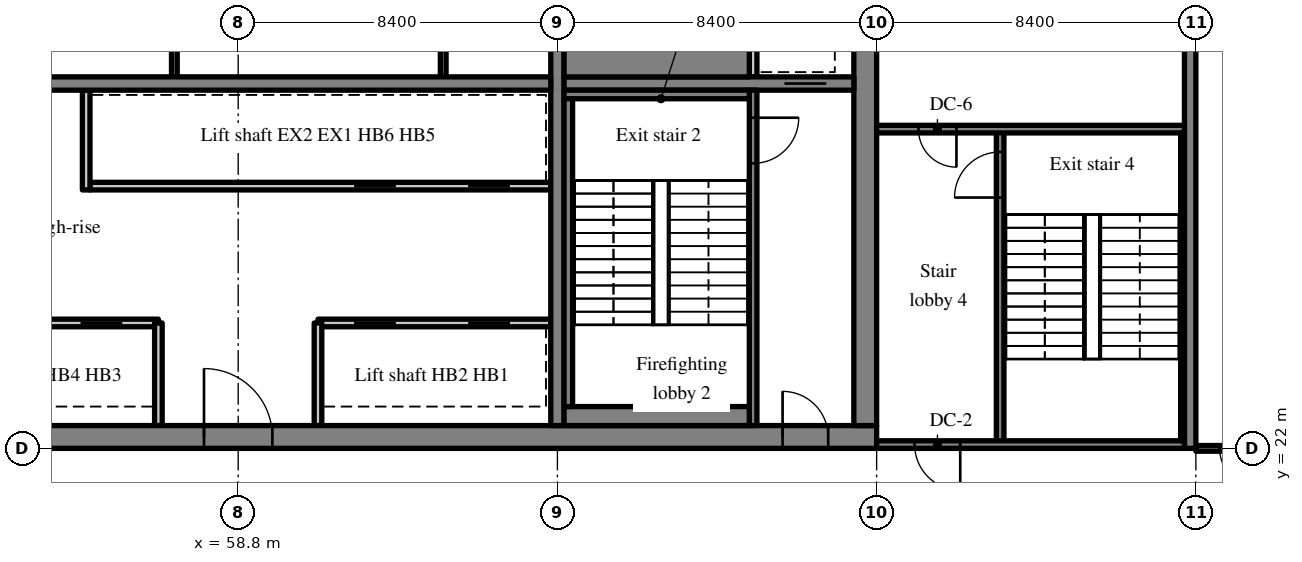
"""IFC4 building model, lengths in metres.
Left out: names, types, materials, properties, quantities, classifications, styles, units other than length and angle.
Written with IfcOpenShell. Run it as: python <this file> out.ifc"""

import sys

from ifc_helpers import new_model, si_unit, direction, frame, frame_2d, origin, place, context, subcontext, project, spatial, rectangle, extrude, source, transform, mapped, element, fill, save


model = new_model("IFC4")
c1 = context("Model", 3, precision=1e-05, world=origin(), true_north=direction((0.0, 1.0)))
c2 = subcontext(c1, "Body", "Model", "MODEL_VIEW")
j1 = project(units=[si_unit("LENGTHUNIT", "METRE"), si_unit("PLANEANGLEUNIT", "RADIAN")], contexts=[c1])
p1 = place(None, origin())
s1 = spatial("IfcSite", under=j1, at=p1, CompositionType="ELEMENT")
p2 = place(p1, origin())
s2 = spatial("IfcBuilding", under=s1, at=p2, CompositionType="ELEMENT")
p3 = place(p2, frame((0.0, 0.0, 217.9)))
s3 = spatial("IfcBuildingStorey", under=s2, at=p3, CompositionType="ELEMENT", Elevation=217.9)
m1 = source(origin(), c2, "Body", "SweptSolid", [
    extrude(rectangle(XDim=50.4, YDim=0.6, at=frame_2d((25.2, 0.0))), origin(), (0.0, 0.0, 1.0), 3.62),
])
p4 = place(p3, frame((25.2, 22.3, 0.0), z_axis=(0.0, 0.0, 1.0), x_axis=(1.0, 0.0, 0.0)))
e1 = element("IfcWall", 1, at=p4, inside=s3, PredefinedType="SHEAR", context=c2, shape_type="MappedRepresentation", body=[
    mapped(m1, transform((0.0, 0.0, 0.0), scale=1.0)),
])
m2 = source(origin(), c2, "Body", "SweptSolid", [
    extrude(rectangle(XDim=1.8, YDim=2.1, at=frame_2d((0.9, 1.05))), frame((0.0, 0.31, 0.0), z_axis=(0.0, -1.0, 0.0), x_axis=(1.0, 0.0, 0.0)), (0.0, 0.0, 1.0), 0.62),
])
p5 = place(p4, frame((15.9, 0.0, 0.0)))
e2 = element("IfcOpeningElement", 2, at=p5, cuts=e1, PredefinedType="OPENING", context=c2, shape_type="MappedRepresentation", body=[
    mapped(m2, transform((0.0, 0.0, 0.0), scale=1.0)),
])
m3 = source(origin(), c2, "Body", "SweptSolid", [
    extrude(rectangle(XDim=0.9, YDim=2.1, at=frame_2d((0.45, 1.05))), frame((0.0, 0.31, 0.0), z_axis=(0.0, -1.0, 0.0), x_axis=(1.0, 0.0, 0.0)), (0.0, 0.0, 1.0), 0.62),
])
p6 = place(p4, frame((9.687, 0.0, 0.0)))
e3 = element("IfcOpeningElement", 3, at=p6, cuts=e1, PredefinedType="OPENING", context=c2, shape_type="MappedRepresentation", body=[
    mapped(m3, transform((0.0, 0.0, 0.0), scale=1.0)),
])
p7 = place(p4, frame((21.513, 0.0, 0.0)))
e4 = element("IfcOpeningElement", 4, at=p7, cuts=e1, PredefinedType="OPENING", context=c2, shape_type="MappedRepresentation", body=[
    mapped(m3, transform((0.0, 0.0, 0.0), scale=1.0)),
])
p8 = place(p4, frame((32.7, 0.0, 0.0)))
e5 = element("IfcOpeningElement", 5, at=p8, cuts=e1, PredefinedType="OPENING", context=c2, shape_type="MappedRepresentation", body=[
    mapped(m2, transform((0.0, 0.0, 0.0), scale=1.0)),
])
m4 = source(origin(), c2, "Body", "SweptSolid", [
    extrude(rectangle(XDim=1.2, YDim=2.1, at=frame_2d((0.6, 1.05))), frame((0.0, 0.31, 0.0), z_axis=(0.0, -1.0, 0.0), x_axis=(1.0, 0.0, 0.0)), (0.0, 0.0, 1.0), 0.62),
])
p9 = place(p4, frame((6.488, 0.0, 0.0)))
e6 = element("IfcOpeningElement", 6, at=p9, cuts=e1, PredefinedType="OPENING", context=c2, shape_type="MappedRepresentation", body=[
    mapped(m4, transform((0.0, 0.0, 0.0), scale=1.0)),
])
p10 = place(p4, frame((47.925, 0.0, 0.0)))
e7 = element("IfcOpeningElement", 7, at=p10, cuts=e1, PredefinedType="OPENING", context=c2, shape_type="MappedRepresentation", body=[
    mapped(m4, transform((0.0, 0.0, 0.0), scale=1.0)),
])
m5 = source(origin(), c2, "Body", "SweptSolid", [
    extrude(rectangle(XDim=18.8, YDim=0.6, at=frame_2d((9.4, 0.0))), origin(), (0.0, 0.0, 1.0), 3.62),
])
p11 = place(p3, frame((75.3, 22.6, 0.0), z_axis=(0.0, 0.0, 1.0), x_axis=(0.0, 1.0, 0.0)))
e8 = element("IfcWall", 8, at=p11, inside=s3, PredefinedType="SHEAR", context=c2, shape_type="MappedRepresentation", body=[
    mapped(m5, transform((0.0, 0.0, 0.0), scale=1.0)),
])
p12 = place(p11, frame((12.8, 0.0, 0.0)))
e9 = element("IfcOpeningElement", 9, at=p12, cuts=e8, PredefinedType="OPENING", context=c2, shape_type="MappedRepresentation", body=[
    mapped(m4, transform((0.0, 0.0, 0.0), scale=1.0)),
])
m6 = source(origin(), c2, "Body", "SweptSolid", [
    extrude(rectangle(XDim=18.8, YDim=0.35, at=frame_2d((9.4, 0.0))), origin(), (0.0, 0.0, 1.0), 3.62),
])
p13 = place(p3, frame((67.2, 22.6, 0.0), z_axis=(0.0, 0.0, 1.0), x_axis=(0.0, 1.0, 0.0)))
e10 = element("IfcWall", 10, at=p13, inside=s3, PredefinedType="SHEAR", context=c2, shape_type="MappedRepresentation", body=[
    mapped(m6, transform((0.0, 0.0, 0.0), scale=1.0)),
])
m7 = source(origin(), c2, "Body", "SweptSolid", [
    extrude(rectangle(XDim=16.45, YDim=0.35, at=frame_2d((8.225, 0.0))), origin(), (0.0, 0.0, 1.0), 3.62),
])
p14 = place(p3, frame((50.575, 31.6, 0.0), z_axis=(0.0, 0.0, 1.0), x_axis=(1.0, 0.0, 0.0)))
e11 = element("IfcWall", 11, at=p14, inside=s3, PredefinedType="SHEAR", context=c2, shape_type="MappedRepresentation", body=[
    mapped(m7, transform((0.0, 0.0, 0.0), scale=1.0)),
])
m8 = source(origin(), c2, "Body", "SweptSolid", [
    extrude(rectangle(XDim=1.0, YDim=2.1, at=frame_2d((0.5, 1.05))), frame((0.0, 0.185, 0.0), z_axis=(0.0, -1.0, 0.0), x_axis=(1.0, 0.0, 0.0)), (0.0, 0.0, 1.0), 0.37),
])
p15 = place(p14, frame((0.613, 0.0, 0.0)))
e12 = element("IfcOpeningElement", 12, at=p15, cuts=e11, PredefinedType="OPENING", context=c2, shape_type="MappedRepresentation", body=[
    mapped(m8, transform((0.0, 0.0, 0.0), scale=1.0)),
])
m9 = source(origin(), c2, "Body", "SweptSolid", [
    extrude(rectangle(XDim=7.625, YDim=0.35, at=frame_2d((3.812, 0.0))), origin(), (0.0, 0.0, 1.0), 3.62),
])
p16 = place(p3, frame((67.375, 31.6, 0.0), z_axis=(0.0, 0.0, 1.0), x_axis=(1.0, 0.0, 0.0)))
e13 = element("IfcWall", 13, at=p16, inside=s3, PredefinedType="SHEAR", context=c2, shape_type="MappedRepresentation", body=[
    mapped(m9, transform((0.0, 0.0, 0.0), scale=1.0)),
])
m10 = source(origin(), c2, "Body", "SweptSolid", [
    extrude(rectangle(XDim=1.1, YDim=2.1, at=frame_2d((0.55, 1.05))), frame((0.0, 0.185, 0.0), z_axis=(0.0, -1.0, 0.0), x_axis=(1.0, 0.0, 0.0)), (0.0, 0.0, 1.0), 0.37),
])
p17 = place(p16, frame((5.8, 0.0, 0.0)))
e14 = element("IfcOpeningElement", 14, at=p17, cuts=e13, PredefinedType="OPENING", context=c2, shape_type="MappedRepresentation", body=[
    mapped(m10, transform((0.0, 0.0, 0.0), scale=1.0)),
])
m11 = source(origin(), c2, "Body", "SweptSolid", [
    extrude(rectangle(XDim=18.4, YDim=0.3, at=frame_2d((9.2, 0.0))), origin(), (0.0, 0.0, 1.0), 3.62),
])
p18 = place(p3, frame((83.85, 22.0, 0.0), z_axis=(0.0, 0.0, 1.0), x_axis=(0.0, 1.0, 0.0)))
e15 = element("IfcWall", 15, at=p18, inside=s3, PredefinedType="SHEAR", context=c2, shape_type="MappedRepresentation", body=[
    mapped(m11, transform((0.0, 0.0, 0.0), scale=1.0)),
])
m12 = source(origin(), c2, "Body", "SweptSolid", [
    extrude(rectangle(XDim=6.125, YDim=0.2, at=frame_2d((3.062, 0.0))), origin(), (0.0, 0.0, 1.0), 3.62),
])
p19 = place(p3, frame((67.025, 25.3, 0.0), z_axis=(0.0, 0.0, 1.0), x_axis=(-1.0, 0.0, 0.0)))
e16 = element("IfcWall", 16, at=p19, inside=s3, PredefinedType="SOLIDWALL", context=c2, shape_type="MappedRepresentation", body=[
    mapped(m12, transform((0.0, 0.0, 0.0), scale=1.0)),
])
m13 = source(origin(), c2, "Body", "SweptSolid", [
    extrude(rectangle(XDim=1.1, YDim=2.1, at=frame_2d((0.55, 1.05))), frame((0.0, 0.11, 0.0), z_axis=(0.0, -1.0, 0.0), x_axis=(1.0, 0.0, 0.0)), (0.0, 0.0, 1.0), 0.22),
])
p20 = place(p19, frame((1.075, 0.0, 0.0)))
e17 = element("IfcOpeningElement", 17, at=p20, cuts=e16, PredefinedType="OPENING", context=c2, shape_type="MappedRepresentation", body=[
    mapped(m13, transform((0.0, 0.0, 0.0), scale=1.0)),
])
p21 = place(p19, frame((4.075, 0.0, 0.0)))
e18 = element("IfcOpeningElement", 18, at=p21, cuts=e16, PredefinedType="OPENING", context=c2, shape_type="MappedRepresentation", body=[
    mapped(m13, transform((0.0, 0.0, 0.0), scale=1.0)),
])
m14 = source(origin(), c2, "Body", "SweptSolid", [
    extrude(rectangle(XDim=6.0, YDim=0.2, at=frame_2d((3.0, 0.0))), origin(), (0.0, 0.0, 1.0), 3.62),
])
p22 = place(p3, frame((56.7, 25.3, 0.0), z_axis=(0.0, 0.0, 1.0), x_axis=(-1.0, 0.0, 0.0)))
e19 = element("IfcWall", 19, at=p22, inside=s3, PredefinedType="SOLIDWALL", context=c2, shape_type="MappedRepresentation", body=[
    mapped(m14, transform((0.0, 0.0, 0.0), scale=1.0)),
])
p23 = place(p22, frame((0.95, 0.0, 0.0)))
e20 = element("IfcOpeningElement", 20, at=p23, cuts=e19, PredefinedType="OPENING", context=c2, shape_type="MappedRepresentation", body=[
    mapped(m13, transform((0.0, 0.0, 0.0), scale=1.0)),
])
p24 = place(p22, frame((3.95, 0.0, 0.0)))
e21 = element("IfcOpeningElement", 21, at=p24, cuts=e19, PredefinedType="OPENING", context=c2, shape_type="MappedRepresentation", body=[
    mapped(m13, transform((0.0, 0.0, 0.0), scale=1.0)),
])
m15 = source(origin(), c2, "Body", "SweptSolid", [
    extrude(rectangle(XDim=12.125, YDim=0.2, at=frame_2d((6.062, 0.0))), origin(), (0.0, 0.0, 1.0), 3.62),
])
p25 = place(p3, frame((67.025, 28.9, 0.0), z_axis=(0.0, 0.0, 1.0), x_axis=(-1.0, 0.0, 0.0)))
e22 = element("IfcWall", 22, at=p25, inside=s3, PredefinedType="SOLIDWALL", context=c2, shape_type="MappedRepresentation", body=[
    mapped(m15, transform((0.0, 0.0, 0.0), scale=1.0)),
])
p26 = place(p25, frame((1.075, 0.0, 0.0)))
e23 = element("IfcOpeningElement", 23, at=p26, cuts=e22, PredefinedType="OPENING", context=c2, shape_type="MappedRepresentation", body=[
    mapped(m13, transform((0.0, 0.0, 0.0), scale=1.0)),
])
p27 = place(p25, frame((4.075, 0.0, 0.0)))
e24 = element("IfcOpeningElement", 24, at=p27, cuts=e22, PredefinedType="OPENING", context=c2, shape_type="MappedRepresentation", body=[
    mapped(m13, transform((0.0, 0.0, 0.0), scale=1.0)),
])
m16 = source(origin(), c2, "Body", "SweptSolid", [
    extrude(rectangle(XDim=2.7, YDim=0.2, at=frame_2d((1.35, 0.0))), origin(), (0.0, 0.0, 1.0), 3.62),
])
for number, where, z_axis, x_axis in (
    (25, (60.9, 22.6, 0.0), (0.0, 0.0, 1.0), (0.0, 1.0, 0.0)),
    (26, (56.7, 22.6, 0.0), (0.0, 0.0, 1.0), (0.0, 1.0, 0.0)),
):
    element("IfcWall", number, at=place(p3, frame(where, z_axis=z_axis, x_axis=x_axis)), inside=s3, PredefinedType="SOLIDWALL", context=c2, shape_type="MappedRepresentation", body=[
        mapped(m16, transform((0.0, 0.0, 0.0), scale=1.0)),
    ])
m17 = source(origin(), c2, "Body", "SweptSolid", [
    extrude(rectangle(XDim=2.625, YDim=0.2, at=frame_2d((1.312, 0.0))), origin(), (0.0, 0.0, 1.0), 3.62),
])
p28 = place(p3, frame((54.8, 28.8, 0.0), z_axis=(0.0, 0.0, 1.0), x_axis=(0.0, 1.0, 0.0)))
e27 = element("IfcWall", 27, at=p28, inside=s3, PredefinedType="SOLIDWALL", context=c2, shape_type="MappedRepresentation", body=[
    mapped(m17, transform((0.0, 0.0, 0.0), scale=1.0)),
])
m18 = source(origin(), c2, "Body", "SweptSolid", [
    extrude(rectangle(XDim=3.225, YDim=0.15, at=frame_2d((1.613, 0.0))), origin(), (0.0, 0.0, 1.0), 3.62),
])
for number, where, z_axis, x_axis in (
    (28, (64.195, 31.775, 0.0), (0.0, 0.0, 1.0), (0.0, 1.0, 0.0)),
    (29, (57.12, 31.775, 0.0), (0.0, 0.0, 1.0), (0.0, 1.0, 0.0)),
):
    element("IfcWall", number, at=place(p3, frame(where, z_axis=z_axis, x_axis=x_axis)), inside=s3, PredefinedType="PARTITIONING", context=c2, shape_type="MappedRepresentation", body=[
        mapped(m18, transform((0.0, 0.0, 0.0), scale=1.0)),
    ])
m19 = source(origin(), c2, "Body", "SweptSolid", [
    extrude(rectangle(XDim=8.825, YDim=0.2, at=frame_2d((4.413, 0.0))), origin(), (0.0, 0.0, 1.0), 3.62),
])
p29 = place(p3, frame((72.35, 22.6, 0.0), z_axis=(0.0, 0.0, 1.0), x_axis=(0.0, 1.0, 0.0)))
e30 = element("IfcWall", 30, at=p29, inside=s3, PredefinedType="SOLIDWALL", context=c2, shape_type="MappedRepresentation", body=[
    mapped(m19, transform((0.0, 0.0, 0.0), scale=1.0)),
])
m20 = source(origin(), c2, "Body", "SweptSolid", [
    extrude(rectangle(XDim=1.2, YDim=2.1, at=frame_2d((0.6, 1.05))), frame((0.0, 0.11, 0.0), z_axis=(0.0, -1.0, 0.0), x_axis=(1.0, 0.0, 0.0)), (0.0, 0.0, 1.0), 0.22),
])
p30 = place(p29, frame((6.9, 0.0, 0.0)))
e31 = element("IfcOpeningElement", 31, at=p30, cuts=e30, PredefinedType="OPENING", context=c2, shape_type="MappedRepresentation", body=[
    mapped(m20, transform((0.0, 0.0, 0.0), scale=1.0)),
])
m21 = source(origin(), c2, "Body", "SweptSolid", [
    extrude(rectangle(XDim=1.825, YDim=0.2, at=frame_2d((0.913, 0.0))), origin(), (0.0, 0.0, 1.0), 3.62),
])
p31 = place(p3, frame((72.35, 31.775, 0.0), z_axis=(0.0, 0.0, 1.0), x_axis=(0.0, 1.0, 0.0)))
e32 = element("IfcWall", 32, at=p31, inside=s3, PredefinedType="SOLIDWALL", context=c2, shape_type="MappedRepresentation", body=[
    mapped(m21, transform((0.0, 0.0, 0.0), scale=1.0)),
])
m22 = source(origin(), c2, "Body", "SweptSolid", [
    extrude(rectangle(XDim=8.3, YDim=0.2, at=frame_2d((4.15, 0.0))), origin(), (0.0, 0.0, 1.0), 3.62),
])
p32 = place(p3, frame((78.85, 22.1, 0.0), z_axis=(0.0, 0.0, 1.0), x_axis=(0.0, 1.0, 0.0)))
e33 = element("IfcWall", 33, at=p32, inside=s3, PredefinedType="SOLIDWALL", context=c2, shape_type="MappedRepresentation", body=[
    mapped(m22, transform((0.0, 0.0, 0.0), scale=1.0)),
])
p33 = place(p32, frame((6.5, 0.0, 0.0)))
e34 = element("IfcOpeningElement", 34, at=p33, cuts=e33, PredefinedType="OPENING", context=c2, shape_type="MappedRepresentation", body=[
    mapped(m20, transform((0.0, 0.0, 0.0), scale=1.0)),
])
m23 = source(origin(), c2, "Body", "SweptSolid", [
    extrude(rectangle(XDim=8.1, YDim=0.2, at=frame_2d((4.05, 0.0))), origin(), (0.0, 0.0, 1.0), 3.62),
])
p34 = place(p3, frame((83.7, 22.1, 0.0), z_axis=(0.0, 0.0, 1.0), x_axis=(-1.0, 0.0, 0.0)))
e35 = element("IfcWall", 35, at=p34, inside=s3, PredefinedType="SOLIDWALL", context=c2, shape_type="MappedRepresentation", body=[
    mapped(m23, transform((0.0, 0.0, 0.0), scale=1.0)),
])
p35 = place(p34, frame((5.9, 0.0, 0.0)))
e36 = element("IfcOpeningElement", 36, at=p35, cuts=e35, PredefinedType="OPENING", context=c2, shape_type="MappedRepresentation", body=[
    mapped(m20, transform((0.0, 0.0, 0.0), scale=1.0)),
])
p36 = place(p3, frame((83.7, 30.4, 0.0), z_axis=(0.0, 0.0, 1.0), x_axis=(-1.0, 0.0, 0.0)))
e37 = element("IfcWall", 37, at=p36, inside=s3, PredefinedType="SOLIDWALL", context=c2, shape_type="MappedRepresentation", body=[
    mapped(m23, transform((0.0, 0.0, 0.0), scale=1.0)),
])
m24 = source(origin(), c2, "Body", "SweptSolid", [
    extrude(rectangle(XDim=1.0, YDim=2.1, at=frame_2d((0.5, 1.05))), frame((0.0, 0.11, 0.0), z_axis=(0.0, -1.0, 0.0), x_axis=(1.0, 0.0, 0.0)), (0.0, 0.0, 1.0), 0.22),
])
p37 = place(p36, frame((6.0, 0.0, 0.0)))
e38 = element("IfcOpeningElement", 38, at=p37, cuts=e37, PredefinedType="OPENING", context=c2, shape_type="MappedRepresentation", body=[
    mapped(m24, transform((0.0, 0.0, 0.0), scale=1.0)),
])
m25 = source(origin(), c2, "Body", "SweptSolid", [
    extrude(rectangle(XDim=4.875, YDim=0.5, at=frame_2d((2.438, 0.0))), origin(), (0.0, 0.0, 1.0), 3.62),
])
p38 = place(p3, frame((67.375, 22.85, 0.0), z_axis=(0.0, 0.0, 1.0), x_axis=(1.0, 0.0, 0.0)))
e39 = element("IfcWall", 39, at=p38, inside=s3, PredefinedType="SOLIDWALL", context=c2, shape_type="MappedRepresentation", body=[
    mapped(m25, transform((0.0, 0.0, 0.0), scale=1.0)),
])
m26 = source(origin(), c2, "Body", "SweptSolid", [
    extrude(rectangle(XDim=4.875, YDim=0.225, at=frame_2d((2.438, 0.0))), origin(), (0.0, 0.0, 1.0), 3.62),
])
p39 = place(p3, frame((67.375, 31.312, 0.0), z_axis=(0.0, 0.0, 1.0), x_axis=(1.0, 0.0, 0.0)))
e40 = element("IfcWall", 40, at=p39, inside=s3, PredefinedType="SOLIDWALL", context=c2, shape_type="MappedRepresentation", body=[
    mapped(m26, transform((0.0, 0.0, 0.0), scale=1.0)),
])
m27 = source(origin(), c2, "Body", "SweptSolid", [
    extrude(rectangle(XDim=8.1, YDim=0.225, at=frame_2d((4.05, 0.0))), origin(), (0.0, 0.0, 1.0), 3.62),
])
p40 = place(p3, frame((67.487, 23.1, 0.0), z_axis=(0.0, 0.0, 1.0), x_axis=(0.0, 1.0, 0.0)))
e41 = element("IfcWall", 41, at=p40, inside=s3, PredefinedType="SOLIDWALL", context=c2, shape_type="MappedRepresentation", body=[
    mapped(m27, transform((0.0, 0.0, 0.0), scale=1.0)),
])
m28 = source(origin(), c2, "Body", "SweptSolid", [
    extrude(rectangle(XDim=4.875, YDim=1.025, at=frame_2d((2.438, 0.0))), origin(), (0.0, 0.0, 1.0), 3.62),
])
p41 = place(p3, frame((67.375, 32.287, 0.0), z_axis=(0.0, 0.0, 1.0), x_axis=(1.0, 0.0, 0.0)))
e42 = element("IfcWall", 42, at=p41, inside=s3, PredefinedType="SOLIDWALL", context=c2, shape_type="MappedRepresentation", body=[
    mapped(m28, transform((0.0, 0.0, 0.0), scale=1.0)),
])
m29 = source(origin(), c2, "Body", "SweptSolid", [
    extrude(rectangle(XDim=8.1, YDim=0.1, at=frame_2d((4.05, 0.0))), origin(), (0.0, 0.0, 1.0), 3.62),
])
p42 = place(p3, frame((83.65, 22.2, 0.0), z_axis=(0.0, 0.0, 1.0), x_axis=(0.0, 1.0, 0.0)))
e43 = element("IfcWall", 43, at=p42, inside=s3, PredefinedType="SOLIDWALL", context=c2, shape_type="MappedRepresentation", body=[
    mapped(m29, transform((0.0, 0.0, 0.0), scale=1.0)),
])
m30 = source(origin(), c2, "Body", "SweptSolid", [
    extrude(rectangle(XDim=1.9, YDim=0.15, at=frame_2d((0.95, 0.0))), origin(), (0.0, 0.0, 1.0), 2.92),
])
p43 = place(p3, frame((84.0, 22.0, 0.0), z_axis=(0.0, 0.0, 1.0), x_axis=(1.0, 0.0, 0.0)))
e44 = element("IfcWall", 44, at=p43, inside=s3, PredefinedType="PARTITIONING", context=c2, shape_type="MappedRepresentation", body=[
    mapped(m30, transform((0.0, 0.0, 0.0), scale=1.0)),
])
m31 = source(origin(), c2, "Body", "SweptSolid", [
    extrude(rectangle(XDim=1.0, YDim=2.1, at=frame_2d((0.5, 1.05))), frame((0.0, 0.085, 0.0), z_axis=(0.0, -1.0, 0.0), x_axis=(1.0, 0.0, 0.0)), (0.0, 0.0, 1.0), 0.17),
])
p44 = place(p43, frame((0.625, 0.0, 0.0)))
e45 = element("IfcOpeningElement", 45, at=p44, cuts=e44, PredefinedType="OPENING", context=c2, shape_type="MappedRepresentation", body=[
    mapped(m31, transform((0.0, 0.0, 0.0), scale=1.0)),
])
m32 = source(origin(), c2, "Body", "SweptSolid", [
    extrude(rectangle(XDim=1.8, YDim=2.1, at=frame_2d((0.9, 1.05))), frame((0.0, 0.225, 0.0), z_axis=(0.0, -1.0, 0.0), x_axis=(1.0, 0.0, 0.0)), (0.0, 0.0, 1.0), 0.05),
])
p45 = place(p8, origin())
e46 = element("IfcDoor", 46, at=p45, inside=s3, OperationType="DOUBLE_DOOR_SINGLE_SWING", PredefinedType="DOOR", context=c2, shape_type="MappedRepresentation", body=[
    mapped(m32, transform((0.0, 0.0, 0.0), scale=1.0)),
])
fill(e5, e46)
m33 = source(origin(), c2, "Body", "SweptSolid", [
    extrude(rectangle(XDim=1.1, YDim=2.1, at=frame_2d((0.55, 1.05))), frame((0.0, 0.025, 0.0), z_axis=(0.0, -1.0, 0.0), x_axis=(1.0, 0.0, 0.0)), (0.0, 0.0, 1.0), 0.05),
])
p46 = place(p20, origin())
e47 = element("IfcDoor", 47, at=p46, inside=s3, OperationType="SLIDING_TO_RIGHT", PredefinedType="DOOR", context=c2, shape_type="MappedRepresentation", body=[
    mapped(m33, transform((0.0, 0.0, 0.0), scale=1.0)),
])
fill(e17, e47)
p47 = place(p21, origin())
e48 = element("IfcDoor", 48, at=p47, inside=s3, OperationType="SLIDING_TO_LEFT", PredefinedType="DOOR", context=c2, shape_type="MappedRepresentation", body=[
    mapped(m33, transform((0.0, 0.0, 0.0), scale=1.0)),
])
fill(e18, e48)
p48 = place(p23, origin())
e49 = element("IfcDoor", 49, at=p48, inside=s3, OperationType="SLIDING_TO_RIGHT", PredefinedType="DOOR", context=c2, shape_type="MappedRepresentation", body=[
    mapped(m33, transform((0.0, 0.0, 0.0), scale=1.0)),
])
fill(e20, e49)
p49 = place(p26, origin())
e50 = element("IfcDoor", 50, at=p49, inside=s3, OperationType="SLIDING_TO_RIGHT", PredefinedType="DOOR", context=c2, shape_type="MappedRepresentation", body=[
    mapped(m33, transform((0.0, 0.0, 0.0), scale=1.0)),
])
fill(e23, e50)
p50 = place(p27, origin())
e51 = element("IfcDoor", 51, at=p50, inside=s3, OperationType="SLIDING_TO_LEFT", PredefinedType="DOOR", context=c2, shape_type="MappedRepresentation", body=[
    mapped(m33, transform((0.0, 0.0, 0.0), scale=1.0)),
])
fill(e24, e51)
m34 = source(origin(), c2, "Body", "SweptSolid", [
    extrude(rectangle(XDim=1.2, YDim=2.1, at=frame_2d((0.6, 1.05))), frame((0.0, 0.025, 0.0), z_axis=(0.0, -1.0, 0.0), x_axis=(1.0, 0.0, 0.0)), (0.0, 0.0, 1.0), 0.05),
])
p51 = place(p30, origin())
e52 = element("IfcDoor", 52, at=p51, inside=s3, OperationType="SINGLE_SWING_RIGHT", PredefinedType="DOOR", context=c2, shape_type="MappedRepresentation", body=[
    mapped(m34, transform((0.0, 0.0, 0.0), scale=1.0)),
])
fill(e31, e52)
m35 = source(origin(), c2, "Body", "SweptSolid", [
    extrude(rectangle(XDim=1.2, YDim=2.1, at=frame_2d((0.6, 1.05))), frame((0.0, 0.225, 0.0), z_axis=(0.0, -1.0, 0.0), x_axis=(1.0, 0.0, 0.0)), (0.0, 0.0, 1.0), 0.05),
])
p52 = place(p10, origin())
e53 = element("IfcDoor", 53, at=p52, inside=s3, OperationType="SINGLE_SWING_LEFT", PredefinedType="DOOR", context=c2, shape_type="MappedRepresentation", body=[
    mapped(m35, transform((0.0, 0.0, 0.0), scale=1.0)),
])
fill(e7, e53)
p53 = place(p17, origin())
e54 = element("IfcDoor", 54, at=p53, inside=s3, OperationType="SLIDING_TO_LEFT", PredefinedType="DOOR", context=c2, shape_type="MappedRepresentation", body=[
    mapped(m33, transform((0.0, 0.0, 0.0), scale=1.0)),
])
fill(e14, e54)
p54 = place(p33, origin())
e55 = element("IfcDoor", 55, at=p54, inside=s3, OperationType="SINGLE_SWING_LEFT", PredefinedType="DOOR", context=c2, shape_type="MappedRepresentation", body=[
    mapped(m34, transform((0.0, 0.0, 0.0), scale=1.0)),
])
fill(e34, e55)
p55 = place(p35, origin())
e56 = element("IfcDoor", 56, at=p55, inside=s3, OperationType="SINGLE_SWING_LEFT", PredefinedType="DOOR", context=c2, shape_type="MappedRepresentation", body=[
    mapped(m34, transform((0.0, 0.0, 0.0), scale=1.0)),
])
fill(e36, e56)
m36 = source(origin(), c2, "Body", "SweptSolid", [
    extrude(rectangle(XDim=1.0, YDim=2.1, at=frame_2d((0.5, 1.05))), frame((0.0, 0.025, 0.0), z_axis=(0.0, -1.0, 0.0), x_axis=(1.0, 0.0, 0.0)), (0.0, 0.0, 1.0), 0.05),
])
p56 = place(p37, origin())
e57 = element("IfcDoor", 57, at=p56, inside=s3, OperationType="SINGLE_SWING_LEFT", PredefinedType="DOOR", context=c2, shape_type="MappedRepresentation", body=[
    mapped(m36, transform((0.0, 0.0, 0.0), scale=1.0)),
])
fill(e38, e57)
p57 = place(p44, origin())
e58 = element("IfcDoor", 58, at=p57, inside=s3, OperationType="SINGLE_SWING_RIGHT", PredefinedType="DOOR", context=c2, shape_type="MappedRepresentation", body=[
    mapped(m36, transform((0.0, 0.0, 0.0), scale=1.0)),
])
fill(e45, e58)
save(model, sys.argv[1])
